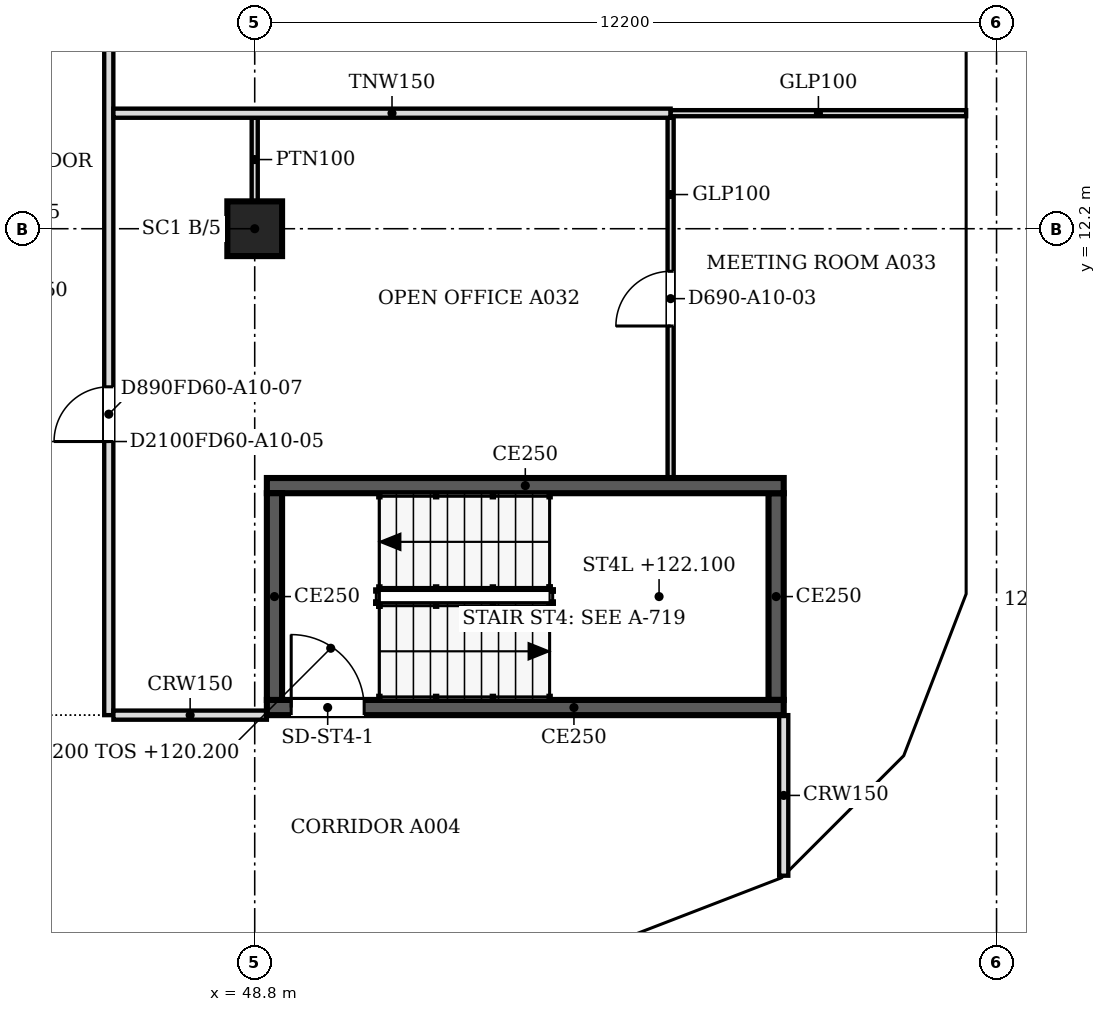
"""IFC4 building model, lengths in metres.
Left out: names, types, materials, properties, quantities, classifications, styles, units other than length and angle.
Written with IfcOpenShell. Run it as: python <this file> out.ifc"""

import sys

from ifc_helpers import new_model, si_unit, direction, frame, frame_2d, origin, origin_2d, place, context, subcontext, project, spatial, polyline, rectangle, outline, extrude, faceted_brep, source, transform, mapped, element, fill, save


model = new_model("IFC4")
c1 = context("Model", 3, precision=1e-05, world=origin(), true_north=direction((0.0, 1.0)))
c2 = subcontext(c1, "Body", "Model", "MODEL_VIEW")
j1 = project(units=[si_unit("LENGTHUNIT", "METRE"), si_unit("PLANEANGLEUNIT", "RADIAN")], contexts=[c1])
p1 = place(None, origin())
s1 = spatial("IfcSite", under=j1, at=p1, CompositionType="ELEMENT")
p2 = place(p1, origin())
s2 = spatial("IfcBuilding", under=s1, at=p2, CompositionType="ELEMENT")
p3 = place(p2, frame((0.0, 0.0, 120.2)))
s3 = spatial("IfcBuildingStorey", under=s2, at=p3, CompositionType="ELEMENT", Elevation=120.2)
p4 = place(p3, frame((48.8, 12.2, 0.0), z_axis=(0.0, 0.0, 1.0), x_axis=(1.0, 0.0, 0.0)))
e1 = element("IfcColumn", 1, at=p4, inside=s3, PredefinedType="COLUMN", context=c2, shape_type="SweptSolid", body=[
    extrude(rectangle(XDim=0.9, YDim=0.9, at=origin_2d()), origin(), (0.0, 0.0, 1.0), 3.6),
])
m1 = source(origin(), c2, "Body", "Brep", [
    faceted_brep([(0.047, -0.25, 0.0), (2.997, -0.25, 3.8), (0.047, -0.25, 7.6), (0.0, -0.25, 7.541), (0.0, -0.25, 0.059), (0.093, 0.25, 7.54), (2.944, 0.25, 3.868), (2.944, 0.25, 3.732), (0.093, 0.25, 0.06), (2.997, 0.0, 3.8), (0.047, 0.0, 0.0), (0.047, 0.0, 7.6)], [[[0, 1, 2, 3, 4]], [[5, 6, 7, 8]], [[8, 7, 9, 1, 0, 10]], [[6, 5, 11, 2, 1, 9]], [[3, 2, 11]], [[10, 0, 4]], [[8, 10, 4, 3, 11, 5]], [[9, 7, 6]]]),
])
p5 = place(p3, frame((54.81, 0.233, -3.8), z_axis=(0.0, 0.0, 1.0), x_axis=(0.932990326376, 0.359901446078, 0.0)))
e2 = element("IfcWall", 2, at=p5, inside=s3, PredefinedType="SOLIDWALL", context=c2, shape_type="MappedRepresentation", body=[
    mapped(m1, transform((0.0, 0.0, 0.0), scale=1.0)),
])
m2 = source(origin(), c2, "Body", "SweptSolid", [
    extrude(outline(polyline([(0.247, 0.665), (2.681, 3.8), (0.247, 6.935), (0.247, 0.665)])), frame((0.0, 0.26, 0.0), z_axis=(0.0, -1.0, 0.0), x_axis=(1.0, 0.0, 0.0)), (0.0, 0.0, 1.0), 0.52),
])
p6 = place(p5, origin())
e3 = element("IfcOpeningElement", 3, at=p6, cuts=e2, PredefinedType="OPENING", context=c2, shape_type="MappedRepresentation", body=[
    mapped(m2, transform((0.0, 0.0, 0.0), scale=1.0)),
])
m3 = source(origin(), c2, "Body", "Brep", [
    faceted_brep([(2.944, -0.25, 0.0), (2.997, -0.25, 0.068), (2.997, -0.25, 7.532), (2.944, -0.25, 7.6), (0.0, -0.25, 3.8), (0.053, 0.25, 3.868), (2.891, 0.25, 7.532), (2.891, 0.25, 0.068), (0.053, 0.25, 3.732), (2.944, 0.0, 0.0), (2.944, 0.0, 7.6), (0.0, 0.0, 3.8)], [[[0, 1, 2, 3, 4]], [[5, 6, 7, 8]], [[1, 0, 9]], [[10, 3, 2]], [[6, 5, 11, 4, 3, 10]], [[8, 7, 9, 0, 4, 11]], [[8, 11, 5]], [[1, 9, 7, 6, 10, 2]]]),
])
p7 = place(p3, frame((57.606, 1.312, -3.8), z_axis=(0.0, 0.0, 1.0), x_axis=(0.707147509625, 0.707066050402, 0.0)))
e4 = element("IfcWall", 4, at=p7, inside=s3, PredefinedType="SOLIDWALL", context=c2, shape_type="MappedRepresentation", body=[
    mapped(m3, transform((0.0, 0.0, 0.0), scale=1.0)),
])
m4 = source(origin(), c2, "Body", "SweptSolid", [
    extrude(outline(polyline([(2.744, 6.934), (0.316, 3.8), (2.744, 0.667), (2.744, 6.934)])), frame((0.0, 0.26, 0.0), z_axis=(0.0, -1.0, 0.0), x_axis=(1.0, 0.0, 0.0)), (0.0, 0.0, 1.0), 0.52),
])
p8 = place(p7, origin())
e5 = element("IfcOpeningElement", 5, at=p8, cuts=e4, PredefinedType="OPENING", context=c2, shape_type="MappedRepresentation", body=[
    mapped(m4, transform((0.0, 0.0, 0.0), scale=1.0)),
])
m5 = source(origin(), c2, "Body", "Brep", [
    faceted_brep([(0.053, -0.25, 0.0), (3.003, -0.25, 3.8), (0.053, -0.25, 7.6), (0.0, -0.25, 7.532), (0.0, -0.25, 0.068), (0.106, 0.25, 7.532), (2.957, 0.25, 3.86), (2.957, 0.25, 3.74), (0.106, 0.25, 0.068), (3.003, 0.0, 3.8), (0.053, 0.0, 0.0), (0.053, 0.0, 7.6)], [[[0, 1, 2, 3, 4]], [[5, 6, 7, 8]], [[8, 7, 9, 1, 0, 10]], [[6, 5, 11, 2, 1, 9]], [[3, 2, 11]], [[10, 0, 4]], [[8, 10, 4, 3, 11, 5]], [[9, 7, 6]]]),
])
p9 = place(p3, frame((59.669, 3.344, -3.8), z_axis=(0.0, 0.0, 1.0), x_axis=(0.35992665181, 0.932980602862, 0.0)))
e6 = element("IfcWall", 6, at=p9, inside=s3, PredefinedType="SOLIDWALL", context=c2, shape_type="MappedRepresentation", body=[
    mapped(m5, transform((0.0, 0.0, 0.0), scale=1.0)),
])
m6 = source(origin(), c2, "Body", "SweptSolid", [
    extrude(outline(polyline([(0.253, 0.665), (2.687, 3.8), (0.253, 6.935), (0.253, 0.665)])), frame((0.0, 0.26, 0.0), z_axis=(0.0, -1.0, 0.0), x_axis=(1.0, 0.0, 0.0)), (0.0, 0.0, 1.0), 0.52),
])
p10 = place(p9, origin())
e7 = element("IfcOpeningElement", 7, at=p10, cuts=e6, PredefinedType="OPENING", context=c2, shape_type="MappedRepresentation", body=[
    mapped(m6, transform((0.0, 0.0, 0.0), scale=1.0)),
])
m7 = source(origin(), c2, "Body", "Brep", [
    faceted_brep([(3.003, -0.25, 0.0), (6.053, -0.25, 3.8), (3.003, -0.25, 7.6), (0.0, -0.25, 3.8), (0.047, 0.25, 3.859), (3.003, 0.25, 7.6), (6.053, 0.25, 3.8), (3.003, 0.25, 0.0), (0.047, 0.25, 3.741), (0.0, 0.0, 3.8)], [[[0, 1, 2, 3]], [[4, 5, 6, 7, 8]], [[7, 6, 1, 0]], [[6, 5, 2, 1]], [[5, 4, 9, 3, 2]], [[8, 7, 0, 3, 9]], [[8, 9, 4]]]),
])
p11 = place(p3, frame((60.75, 6.146, -3.8), z_axis=(0.0, 0.0, 1.0), x_axis=(0.0, 1.0, 0.0)))
e8 = element("IfcWall", 8, at=p11, inside=s3, PredefinedType="SOLIDWALL", context=c2, shape_type="MappedRepresentation", body=[
    mapped(m7, transform((0.0, 0.0, 0.0), scale=1.0)),
])
m8 = source(origin(), c2, "Body", "SweptSolid", [
    extrude(outline(polyline([(3.005, 0.401), (5.733, 3.8), (3.005, 7.199), (0.319, 3.8), (3.005, 0.401)])), frame((0.0, 0.26, 0.0), z_axis=(0.0, -1.0, 0.0), x_axis=(1.0, 0.0, 0.0)), (0.0, 0.0, 1.0), 0.52),
])
p12 = place(p11, origin())
e9 = element("IfcOpeningElement", 9, at=p12, cuts=e8, PredefinedType="OPENING", context=c2, shape_type="MappedRepresentation", body=[
    mapped(m8, transform((0.0, 0.0, 0.0), scale=1.0)),
])
m9 = source(origin(), c2, "Body", "SweptSolid", [
    extrude(outline(polyline([(3.05, 0.0), (6.1, 3.8), (3.05, 7.6), (0.0, 3.8), (3.05, 0.0)])), frame((0.0, 0.25, 0.0), z_axis=(0.0, -1.0, 0.0), x_axis=(1.0, 0.0, 0.0)), (0.0, 0.0, 1.0), 0.5),
])
p13 = place(p3, frame((60.75, 12.2, -3.8), z_axis=(0.0, 0.0, 1.0), x_axis=(0.0, 1.0, 0.0)))
e10 = element("IfcWall", 10, at=p13, inside=s3, PredefinedType="SOLIDWALL", context=c2, shape_type="MappedRepresentation", body=[
    mapped(m9, transform((0.0, 0.0, 0.0), scale=1.0)),
])
m10 = source(origin(), c2, "Body", "SweptSolid", [
    extrude(outline(polyline([(3.05, 0.399), (5.78, 3.8), (3.05, 7.201), (0.321, 3.8), (3.05, 0.399)])), frame((0.0, 0.26, 0.0), z_axis=(0.0, -1.0, 0.0), x_axis=(1.0, 0.0, 0.0)), (0.0, 0.0, 1.0), 0.52),
])
p14 = place(p13, origin())
e11 = element("IfcOpeningElement", 11, at=p14, cuts=e10, PredefinedType="OPENING", context=c2, shape_type="MappedRepresentation", body=[
    mapped(m10, transform((0.0, 0.0, 0.0), scale=1.0)),
])
p15 = place(p2, frame((0.0, 0.0, 124.0)))
s4 = spatial("IfcBuildingStorey", under=s2, at=p15, CompositionType="ELEMENT", Elevation=124.0)
m11 = source(origin(), c2, "Body", "Brep", [
    faceted_brep([(2.95, -0.25, 0.0), (3.003, -0.25, 0.068), (3.003, -0.25, 7.532), (2.95, -0.25, 7.6), (0.0, -0.25, 3.8), (0.047, 0.25, 3.86), (2.898, 0.25, 7.532), (2.898, 0.25, 0.068), (0.047, 0.25, 3.74), (2.95, 0.0, 0.0), (2.95, 0.0, 7.6), (0.0, 0.0, 3.8)], [[[0, 1, 2, 3, 4]], [[5, 6, 7, 8]], [[1, 0, 9]], [[10, 3, 2]], [[6, 5, 11, 4, 3, 10]], [[8, 7, 9, 0, 4, 11]], [[8, 11, 5]], [[1, 9, 7, 6, 10, 2]]]),
])
p16 = place(p15, frame((54.854, 0.25, -3.8), z_axis=(0.0, 0.0, 1.0), x_axis=(0.932970071518, 0.359953949349, 0.0)))
e12 = element("IfcWall", 12, at=p16, inside=s4, PredefinedType="SOLIDWALL", context=c2, shape_type="MappedRepresentation", body=[
    mapped(m11, transform((0.0, 0.0, 0.0), scale=1.0)),
])
m12 = source(origin(), c2, "Body", "SweptSolid", [
    extrude(outline(polyline([(2.75, 6.935), (0.316, 3.8), (2.75, 0.665), (2.75, 6.935)])), frame((0.0, 0.26, 0.0), z_axis=(0.0, -1.0, 0.0), x_axis=(1.0, 0.0, 0.0)), (0.0, 0.0, 1.0), 0.52),
])
p17 = place(p16, origin())
e13 = element("IfcOpeningElement", 13, at=p17, cuts=e12, PredefinedType="OPENING", context=c2, shape_type="MappedRepresentation", body=[
    mapped(m12, transform((0.0, 0.0, 0.0), scale=1.0)),
])
m13 = source(origin(), c2, "Body", "Brep", [
    faceted_brep([(0.053, -0.25, 0.0), (2.997, -0.25, 3.8), (0.053, -0.25, 7.6), (0.0, -0.25, 7.532), (0.0, -0.25, 0.068), (0.106, 0.25, 7.532), (2.944, 0.25, 3.868), (2.944, 0.25, 3.732), (0.106, 0.25, 0.068), (2.997, 0.0, 3.8), (0.053, 0.0, 0.0), (0.053, 0.0, 7.6)], [[[0, 1, 2, 3, 4]], [[5, 6, 7, 8]], [[8, 7, 9, 1, 0, 10]], [[6, 5, 11, 2, 1, 9]], [[3, 2, 11]], [[10, 0, 4]], [[8, 10, 4, 3, 11, 5]], [[9, 7, 6]]]),
])
p18 = place(p15, frame((57.569, 1.274, -3.8), z_axis=(0.0, 0.0, 1.0), x_axis=(0.707066050402, 0.707147509625, 0.0)))
e14 = element("IfcWall", 14, at=p18, inside=s4, PredefinedType="SOLIDWALL", context=c2, shape_type="MappedRepresentation", body=[
    mapped(m13, transform((0.0, 0.0, 0.0), scale=1.0)),
])
m14 = source(origin(), c2, "Body", "SweptSolid", [
    extrude(outline(polyline([(0.253, 0.666), (2.681, 3.8), (0.253, 6.934), (0.253, 0.666)])), frame((0.0, 0.26, 0.0), z_axis=(0.0, -1.0, 0.0), x_axis=(1.0, 0.0, 0.0)), (0.0, 0.0, 1.0), 0.52),
])
p19 = place(p18, origin())
e15 = element("IfcOpeningElement", 15, at=p19, cuts=e14, PredefinedType="OPENING", context=c2, shape_type="MappedRepresentation", body=[
    mapped(m14, transform((0.0, 0.0, 0.0), scale=1.0)),
])
m15 = source(origin(), c2, "Body", "Brep", [
    faceted_brep([(2.95, -0.25, 0.0), (2.997, -0.25, 0.059), (2.997, -0.25, 7.541), (2.95, -0.25, 7.6), (0.0, -0.25, 3.8), (0.053, 0.25, 3.868), (2.904, 0.25, 7.54), (2.904, 0.25, 0.06), (0.053, 0.25, 3.732), (2.95, 0.0, 0.0), (2.95, 0.0, 7.6), (0.0, 0.0, 3.8)], [[[0, 1, 2, 3, 4]], [[5, 6, 7, 8]], [[1, 0, 9]], [[10, 3, 2]], [[6, 5, 11, 4, 3, 10]], [[8, 7, 9, 0, 4, 11]], [[8, 11, 5]], [[1, 9, 7, 6, 10, 2]]]),
])
p20 = place(p15, frame((59.688, 3.394, -3.8), z_axis=(0.0, 0.0, 1.0), x_axis=(0.359972353723, 0.932962970624, 0.0)))
e16 = element("IfcWall", 16, at=p20, inside=s4, PredefinedType="SOLIDWALL", context=c2, shape_type="MappedRepresentation", body=[
    mapped(m15, transform((0.0, 0.0, 0.0), scale=1.0)),
])
p21 = place(p20, origin())
e17 = element("IfcOpeningElement", 17, at=p21, cuts=e16, PredefinedType="OPENING", context=c2, shape_type="MappedRepresentation", body=[
    mapped(m12, transform((0.0, 0.0, 0.0), scale=1.0)),
])
m16 = source(origin(), c2, "Body", "Brep", [
    faceted_brep([(0.047, -0.25, 0.0), (3.05, -0.25, 3.8), (0.047, -0.25, 7.6), (0.0, -0.25, 7.54), (0.0, -0.25, 0.06), (0.093, 0.25, 7.541), (3.05, 0.25, 3.8), (0.093, 0.25, 0.059), (0.047, 0.0, 0.0), (0.047, 0.0, 7.6)], [[[0, 1, 2, 3, 4]], [[5, 6, 7]], [[7, 6, 1, 0, 8]], [[6, 5, 9, 2, 1]], [[3, 2, 9]], [[8, 0, 4]], [[7, 8, 4, 3, 9, 5]]]),
])
p22 = place(p15, frame((60.75, 6.1, -3.8), z_axis=(0.0, 0.0, 1.0), x_axis=(0.0, 1.0, 0.0)))
e18 = element("IfcWall", 18, at=p22, inside=s4, PredefinedType="SOLIDWALL", context=c2, shape_type="MappedRepresentation", body=[
    mapped(m16, transform((0.0, 0.0, 0.0), scale=1.0)),
])
m17 = source(origin(), c2, "Body", "SweptSolid", [
    extrude(outline(polyline([(0.247, 0.656), (2.731, 3.8), (0.247, 6.944), (0.247, 0.656)])), frame((0.0, 0.26, 0.0), z_axis=(0.0, -1.0, 0.0), x_axis=(1.0, 0.0, 0.0)), (0.0, 0.0, 1.0), 0.52),
])
p23 = place(p22, origin())
e19 = element("IfcOpeningElement", 19, at=p23, cuts=e18, PredefinedType="OPENING", context=c2, shape_type="MappedRepresentation", body=[
    mapped(m17, transform((0.0, 0.0, 0.0), scale=1.0)),
])
p24 = place(p15, frame((60.75, 9.15, -3.8), z_axis=(0.0, 0.0, 1.0), x_axis=(0.0, 1.0, 0.0)))
e20 = element("IfcWall", 20, at=p24, inside=s4, PredefinedType="SOLIDWALL", context=c2, shape_type="MappedRepresentation", body=[
    mapped(m9, transform((0.0, 0.0, 0.0), scale=1.0)),
])
p25 = place(p24, origin())
e21 = element("IfcOpeningElement", 21, at=p25, cuts=e20, PredefinedType="OPENING", context=c2, shape_type="MappedRepresentation", body=[
    mapped(m10, transform((0.0, 0.0, 0.0), scale=1.0)),
])
p26 = place(p3, frame((57.5, 4.325, 0.0), z_axis=(0.0, 0.0, 1.0), x_axis=(-1.0, 0.0, 0.0)))
e22 = element("IfcWall", 22, at=p26, inside=s3, PredefinedType="SOLIDWALL", context=c2, shape_type="SweptSolid", body=[
    extrude(rectangle(XDim=8.5, YDim=0.25, at=frame_2d((4.25, 0.0))), origin(), (0.0, 0.0, 1.0), 3.8),
])
m18 = source(origin(), c2, "Body", "SweptSolid", [
    extrude(rectangle(XDim=1.2, YDim=2.1, at=frame_2d((0.6, 1.05))), frame((0.0, 0.135, 0.0), z_axis=(0.0, -1.0, 0.0), x_axis=(1.0, 0.0, 0.0)), (0.0, 0.0, 1.0), 0.27),
])
p27 = place(p26, frame((6.9, 0.0, 0.0)))
e23 = element("IfcOpeningElement", 23, at=p27, cuts=e22, PredefinedType="OPENING", context=c2, shape_type="MappedRepresentation", body=[
    mapped(m18, transform((0.0, 0.0, 0.0), scale=1.0)),
])
p28 = place(p3, frame((49.125, 4.45, 0.0), z_axis=(0.0, 0.0, 1.0), x_axis=(0.0, 1.0, 0.0)))
e24 = element("IfcWall", 24, at=p28, inside=s3, PredefinedType="SOLIDWALL", context=c2, shape_type="SweptSolid", body=[
    extrude(rectangle(XDim=3.4, YDim=0.25, at=frame_2d((1.7, 0.0))), origin(), (0.0, 0.0, 1.0), 3.8),
])
p29 = place(p3, frame((49.0, 7.975, 0.0), z_axis=(0.0, 0.0, 1.0), x_axis=(1.0, 0.0, 0.0)))
e25 = element("IfcWall", 25, at=p29, inside=s3, PredefinedType="SOLIDWALL", context=c2, shape_type="SweptSolid", body=[
    extrude(rectangle(XDim=8.5, YDim=0.25, at=frame_2d((4.25, 0.0))), origin(), (0.0, 0.0, 1.0), 3.8),
])
p30 = place(p3, frame((57.375, 7.85, 0.0), z_axis=(0.0, 0.0, 1.0), x_axis=(0.0, -1.0, 0.0)))
e26 = element("IfcWall", 26, at=p30, inside=s3, PredefinedType="SOLIDWALL", context=c2, shape_type="SweptSolid", body=[
    extrude(rectangle(XDim=3.4, YDim=0.25, at=frame_2d((1.7, 0.0))), origin(), (0.0, 0.0, 1.0), 3.8),
])
p31 = place(p3, frame((57.5, 1.559, 0.0), z_axis=(0.0, 0.0, 1.0), x_axis=(0.0, 1.0, 0.0)))
e27 = element("IfcWall", 27, at=p31, inside=s3, PredefinedType="PARTITIONING", context=c2, shape_type="SweptSolid", body=[
    extrude(rectangle(XDim=2.641, YDim=0.15, at=frame_2d((1.32, 0.0))), origin(), (0.0, 0.0, 1.0), 3.067),
])
p32 = place(p3, frame((46.4, 21.924, 0.0), z_axis=(0.0, 0.0, 1.0), x_axis=(0.0, -1.0, 0.0)))
e28 = element("IfcWall", 28, at=p32, inside=s3, PredefinedType="PARTITIONING", context=c2, shape_type="SweptSolid", body=[
    extrude(rectangle(XDim=17.724, YDim=0.15, at=frame_2d((8.862, 0.0))), origin(), (0.0, 0.0, 1.0), 3.067),
])
m19 = source(origin(), c2, "Body", "SweptSolid", [
    extrude(rectangle(XDim=1.0, YDim=2.1, at=frame_2d((0.5, 1.05))), frame((0.0, 0.085, 0.0), z_axis=(0.0, -1.0, 0.0), x_axis=(1.0, 0.0, 0.0)), (0.0, 0.0, 1.0), 0.17),
])
p33 = place(p32, frame((3.423, 0.0, 0.0)))
e29 = element("IfcOpeningElement", 29, at=p33, cuts=e28, PredefinedType="OPENING", context=c2, shape_type="MappedRepresentation", body=[
    mapped(m19, transform((0.0, 0.0, 0.0), scale=1.0)),
])
m20 = source(origin(), c2, "Body", "SweptSolid", [
    extrude(rectangle(XDim=0.9, YDim=2.1, at=frame_2d((0.45, 1.05))), frame((0.0, 0.085, 0.0), z_axis=(0.0, -1.0, 0.0), x_axis=(1.0, 0.0, 0.0)), (0.0, 0.0, 1.0), 0.17),
])
p34 = place(p32, frame((12.324, 0.0, 0.0)))
e30 = element("IfcOpeningElement", 30, at=p34, cuts=e28, PredefinedType="OPENING", context=c2, shape_type="MappedRepresentation", body=[
    mapped(m20, transform((0.0, 0.0, 0.0), scale=1.0)),
])
p35 = place(p3, frame((46.476, 4.2, 0.0), z_axis=(0.0, 0.0, 1.0), x_axis=(1.0, 0.0, 0.0)))
e31 = element("IfcWall", 31, at=p35, inside=s3, PredefinedType="PARTITIONING", context=c2, shape_type="SweptSolid", body=[
    extrude(rectangle(XDim=2.524, YDim=0.15, at=frame_2d((1.262, 0.0))), origin(), (0.0, 0.0, 1.0), 3.067),
])
p36 = place(p3, frame((55.64, 14.024, 0.0), z_axis=(0.0, 0.0, 1.0), x_axis=(0.0, -1.0, 0.0)))
e32 = element("IfcWall", 32, at=p36, inside=s3, PredefinedType="PARTITIONING", context=c2, shape_type="SweptSolid", body=[
    extrude(rectangle(XDim=5.924, YDim=0.1, at=frame_2d((2.962, 0.0))), origin(), (0.0, 0.0, 1.0), 3.067),
])
m21 = source(origin(), c2, "Body", "SweptSolid", [
    extrude(rectangle(XDim=0.9, YDim=2.1, at=frame_2d((0.45, 1.05))), frame((0.0, 0.06, 0.0), z_axis=(0.0, -1.0, 0.0), x_axis=(1.0, 0.0, 0.0)), (0.0, 0.0, 1.0), 0.12),
])
p37 = place(p36, frame((2.524, 0.0, 0.0)))
e33 = element("IfcOpeningElement", 33, at=p37, cuts=e32, PredefinedType="OPENING", context=c2, shape_type="MappedRepresentation", body=[
    mapped(m21, transform((0.0, 0.0, 0.0), scale=1.0)),
])
p38 = place(p3, frame((48.8, 12.65, 0.0), z_axis=(0.0, 0.0, 1.0), x_axis=(0.0, 1.0, 0.0)))
e34 = element("IfcWall", 34, at=p38, inside=s3, PredefinedType="PARTITIONING", context=c2, shape_type="SweptSolid", body=[
    extrude(rectangle(XDim=1.375, YDim=0.1, at=frame_2d((0.688, 0.0))), origin(), (0.0, 0.0, 1.0), 3.067),
])
p39 = place(p3, frame((46.476, 14.1, 0.0), z_axis=(0.0, 0.0, 1.0), x_axis=(1.0, 0.0, 0.0)))
e35 = element("IfcWall", 35, at=p39, inside=s3, PredefinedType="PARTITIONING", context=c2, shape_type="SweptSolid", body=[
    extrude(rectangle(XDim=9.164, YDim=0.15, at=frame_2d((4.582, 0.0))), origin(), (0.0, 0.0, 1.0), 3.067),
])
p40 = place(p3, frame((55.641, 14.1, 0.0), z_axis=(0.0, 0.0, 1.0), x_axis=(1.0, 0.0, 0.0)))
e36 = element("IfcWall", 36, at=p40, inside=s3, PredefinedType="PARTITIONING", context=c2, shape_type="SweptSolid", body=[
    extrude(rectangle(XDim=4.859, YDim=0.1, at=frame_2d((2.429, 0.0))), origin(), (0.0, 0.0, 1.0), 3.067),
])
m22 = source(origin(), c2, "Body", "SweptSolid", [
    extrude(rectangle(XDim=1.2, YDim=2.1, at=frame_2d((0.6, 1.05))), frame((0.0, 0.025, 0.0), z_axis=(0.0, -1.0, 0.0), x_axis=(1.0, 0.0, 0.0)), (0.0, 0.0, 1.0), 0.05),
])
p41 = place(p27, origin())
e37 = element("IfcDoor", 37, at=p41, inside=s3, OperationType="SINGLE_SWING_RIGHT", PredefinedType="DOOR", context=c2, shape_type="MappedRepresentation", body=[
    mapped(m22, transform((0.0, 0.0, 0.0), scale=1.0)),
])
fill(e23, e37)
m23 = source(origin(), c2, "Body", "SweptSolid", [
    extrude(rectangle(XDim=0.9, YDim=2.1, at=frame_2d((0.45, 1.05))), frame((0.0, 0.025, 0.0), z_axis=(0.0, -1.0, 0.0), x_axis=(1.0, 0.0, 0.0)), (0.0, 0.0, 1.0), 0.05),
])
p42 = place(p37, origin())
e38 = element("IfcDoor", 38, at=p42, inside=s3, OperationType="SINGLE_SWING_RIGHT", PredefinedType="DOOR", context=c2, shape_type="MappedRepresentation", body=[
    mapped(m23, transform((0.0, 0.0, 0.0), scale=1.0)),
])
fill(e33, e38)
p43 = place(p34, origin())
e39 = element("IfcDoor", 39, at=p43, inside=s3, OperationType="SINGLE_SWING_RIGHT", PredefinedType="DOOR", context=c2, shape_type="MappedRepresentation", body=[
    mapped(m23, transform((0.0, 0.0, 0.0), scale=1.0)),
])
fill(e30, e39)
save(model, sys.argv[1])
